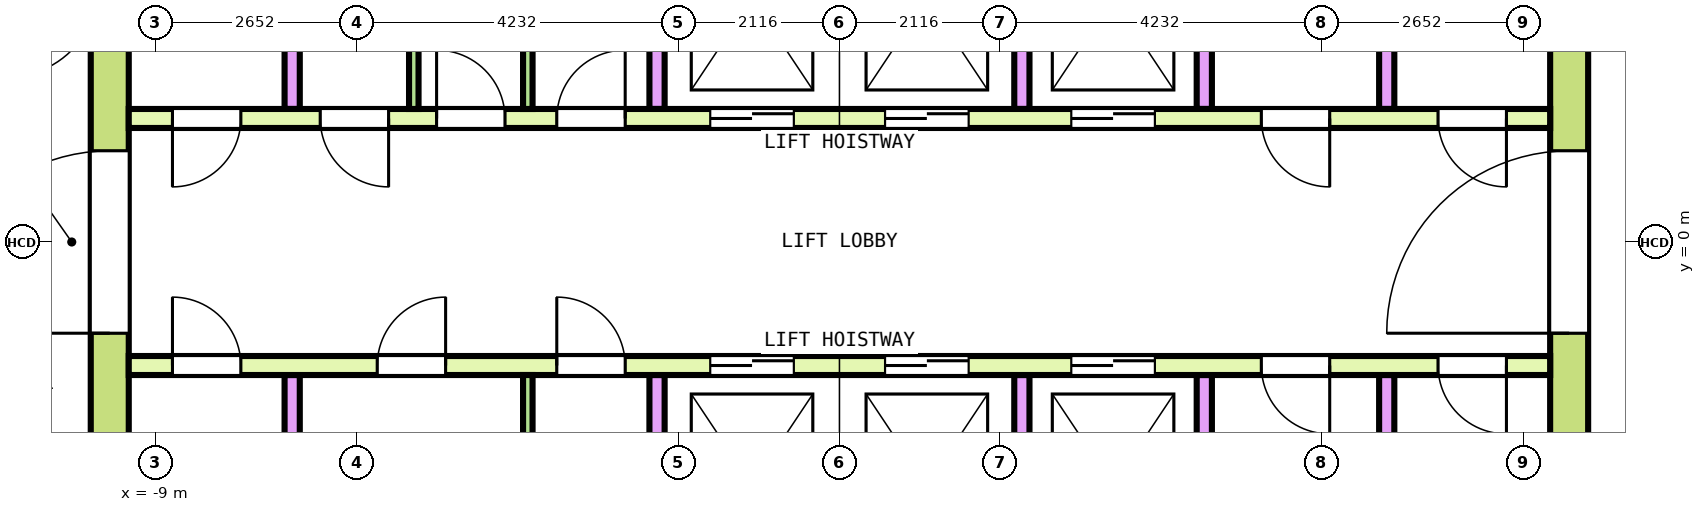
"""IFC4 building model, lengths in metres.
Left out: names, types, materials, properties, quantities, classifications, styles, units other than length and angle.
Written with IfcOpenShell. Run it as: python <this file> out.ifc"""

import sys

from ifc_helpers import new_model, si_unit, direction, frame, frame_2d, origin, place, context, subcontext, project, spatial, rectangle, extrude, element, fill, save


model = new_model("IFC4")
c1 = context("Model", 3, precision=1e-05, world=origin(), true_north=direction((0.0, 1.0)))
c2 = subcontext(c1, "Body", "Model", "MODEL_VIEW")
j1 = project(units=[si_unit("LENGTHUNIT", "METRE"), si_unit("PLANEANGLEUNIT", "RADIAN")], contexts=[c1])
p1 = place(None, origin())
s1 = spatial("IfcSite", under=j1, at=p1, CompositionType="ELEMENT")
p2 = place(p1, origin())
s2 = spatial("IfcBuilding", under=s1, at=p2, CompositionType="ELEMENT")
p3 = place(p2, frame((0.0, 0.0, 308.6)))
s3 = spatial("IfcBuildingStorey", under=s2, at=p3, CompositionType="ELEMENT", Elevation=308.6)
p4 = place(p3, frame((-9.6, -7.85, 0.0), z_axis=(0.0, 0.0, 1.0), x_axis=(0.0, 1.0, 0.0)))
e1 = element("IfcWall", 1, at=p4, inside=s3, PredefinedType="SHEAR", context=c2, shape_type="SweptSolid", body=[
    extrude(rectangle(XDim=15.7, YDim=0.5, at=frame_2d((7.85, 0.0))), origin(), (0.0, 0.0, 1.0), 3.7),
])
p5 = place(p4, frame((6.65, 0.0, 0.0)))
e2 = element("IfcOpeningElement", 2, at=p5, cuts=e1, PredefinedType="OPENING", context=c2, shape_type="SweptSolid", body=[
    extrude(rectangle(XDim=2.4, YDim=2.1, at=frame_2d((1.2, 1.05))), frame((0.0, 0.26, 0.0), z_axis=(0.0, -1.0, 0.0), x_axis=(1.0, 0.0, 0.0)), (0.0, 0.0, 1.0), 0.52),
])
p6 = place(p4, frame((13.55, 0.0, 0.0)))
e3 = element("IfcOpeningElement", 3, at=p6, cuts=e1, PredefinedType="OPENING", context=c2, shape_type="SweptSolid", body=[
    extrude(rectangle(XDim=1.2, YDim=2.1, at=frame_2d((0.6, 1.05))), frame((0.0, 0.26, 0.0), z_axis=(0.0, -1.0, 0.0), x_axis=(1.0, 0.0, 0.0)), (0.0, 0.0, 1.0), 0.52),
])
p7 = place(p4, frame((0.95, 0.0, 0.0)))
e4 = element("IfcOpeningElement", 4, at=p7, cuts=e1, PredefinedType="OPENING", context=c2, shape_type="SweptSolid", body=[
    extrude(rectangle(XDim=1.2, YDim=2.1, at=frame_2d((0.6, 1.05))), frame((0.0, 0.26, 0.0), z_axis=(0.0, -1.0, 0.0), x_axis=(1.0, 0.0, 0.0)), (0.0, 0.0, 1.0), 0.52),
])
p8 = place(p3, frame((9.6, -7.85, 0.0), z_axis=(0.0, 0.0, 1.0), x_axis=(0.0, 1.0, 0.0)))
e5 = element("IfcWall", 5, at=p8, inside=s3, PredefinedType="SHEAR", context=c2, shape_type="SweptSolid", body=[
    extrude(rectangle(XDim=15.7, YDim=0.5, at=frame_2d((7.85, 0.0))), origin(), (0.0, 0.0, 1.0), 3.7),
])
p9 = place(p8, frame((6.65, 0.0, 0.0)))
e6 = element("IfcOpeningElement", 6, at=p9, cuts=e5, PredefinedType="OPENING", context=c2, shape_type="SweptSolid", body=[
    extrude(rectangle(XDim=2.4, YDim=2.1, at=frame_2d((1.2, 1.05))), frame((0.0, 0.26, 0.0), z_axis=(0.0, -1.0, 0.0), x_axis=(1.0, 0.0, 0.0)), (0.0, 0.0, 1.0), 0.52),
])
p10 = place(p8, frame((13.55, 0.0, 0.0)))
e7 = element("IfcOpeningElement", 7, at=p10, cuts=e5, PredefinedType="OPENING", context=c2, shape_type="SweptSolid", body=[
    extrude(rectangle(XDim=1.2, YDim=2.1, at=frame_2d((0.6, 1.05))), frame((0.0, 0.26, 0.0), z_axis=(0.0, -1.0, 0.0), x_axis=(1.0, 0.0, 0.0)), (0.0, 0.0, 1.0), 0.52),
])
p11 = place(p8, frame((1.05, 0.0, 0.0)))
e8 = element("IfcOpeningElement", 8, at=p11, cuts=e5, PredefinedType="OPENING", context=c2, shape_type="SweptSolid", body=[
    extrude(rectangle(XDim=1.0, YDim=2.1, at=frame_2d((0.5, 1.05))), frame((0.0, 0.26, 0.0), z_axis=(0.0, -1.0, 0.0), x_axis=(1.0, 0.0, 0.0)), (0.0, 0.0, 1.0), 0.52),
])
p12 = place(p3, frame((-9.35, 1.625, 0.0), z_axis=(0.0, 0.0, 1.0), x_axis=(1.0, 0.0, 0.0)))
e9 = element("IfcWall", 9, at=p12, inside=s3, PredefinedType="SOLIDWALL", context=c2, shape_type="SweptSolid", body=[
    extrude(rectangle(XDim=18.7, YDim=0.25, at=frame_2d((9.35, 0.0))), origin(), (0.0, 0.0, 1.0), 3.7),
])
p13 = place(p12, frame((7.65, 0.0, 0.0)))
e10 = element("IfcOpeningElement", 10, at=p13, cuts=e9, PredefinedType="OPENING", context=c2, shape_type="SweptSolid", body=[
    extrude(rectangle(XDim=1.1, YDim=2.1, at=frame_2d((0.55, 1.05))), frame((0.0, 0.135, 0.0), z_axis=(0.0, -1.0, 0.0), x_axis=(1.0, 0.0, 0.0)), (0.0, 0.0, 1.0), 0.27),
])
p14 = place(p12, frame((9.95, 0.0, 0.0)))
e11 = element("IfcOpeningElement", 11, at=p14, cuts=e9, PredefinedType="OPENING", context=c2, shape_type="SweptSolid", body=[
    extrude(rectangle(XDim=1.1, YDim=2.1, at=frame_2d((0.55, 1.05))), frame((0.0, 0.135, 0.0), z_axis=(0.0, -1.0, 0.0), x_axis=(1.0, 0.0, 0.0)), (0.0, 0.0, 1.0), 0.27),
])
p15 = place(p12, frame((12.4, 0.0, 0.0)))
e12 = element("IfcOpeningElement", 12, at=p15, cuts=e9, PredefinedType="OPENING", context=c2, shape_type="SweptSolid", body=[
    extrude(rectangle(XDim=1.1, YDim=2.1, at=frame_2d((0.55, 1.05))), frame((0.0, 0.135, 0.0), z_axis=(0.0, -1.0, 0.0), x_axis=(1.0, 0.0, 0.0)), (0.0, 0.0, 1.0), 0.27),
])
p16 = place(p12, frame((0.575, 0.0, 0.0)))
e13 = element("IfcOpeningElement", 13, at=p16, cuts=e9, PredefinedType="OPENING", context=c2, shape_type="SweptSolid", body=[
    extrude(rectangle(XDim=0.9, YDim=2.1, at=frame_2d((0.45, 1.05))), frame((0.0, 0.135, 0.0), z_axis=(0.0, -1.0, 0.0), x_axis=(1.0, 0.0, 0.0)), (0.0, 0.0, 1.0), 0.27),
])
p17 = place(p12, frame((2.519, 0.0, 0.0)))
e14 = element("IfcOpeningElement", 14, at=p17, cuts=e9, PredefinedType="OPENING", context=c2, shape_type="SweptSolid", body=[
    extrude(rectangle(XDim=0.9, YDim=2.1, at=frame_2d((0.45, 1.05))), frame((0.0, 0.135, 0.0), z_axis=(0.0, -1.0, 0.0), x_axis=(1.0, 0.0, 0.0)), (0.0, 0.0, 1.0), 0.27),
])
p18 = place(p12, frame((4.05, 0.0, 0.0)))
e15 = element("IfcOpeningElement", 15, at=p18, cuts=e9, PredefinedType="OPENING", context=c2, shape_type="SweptSolid", body=[
    extrude(rectangle(XDim=0.9, YDim=2.1, at=frame_2d((0.45, 1.05))), frame((0.0, 0.135, 0.0), z_axis=(0.0, -1.0, 0.0), x_axis=(1.0, 0.0, 0.0)), (0.0, 0.0, 1.0), 0.27),
])
p19 = place(p12, frame((5.631, 0.0, 0.0)))
e16 = element("IfcOpeningElement", 16, at=p19, cuts=e9, PredefinedType="OPENING", context=c2, shape_type="SweptSolid", body=[
    extrude(rectangle(XDim=0.9, YDim=2.1, at=frame_2d((0.45, 1.05))), frame((0.0, 0.135, 0.0), z_axis=(0.0, -1.0, 0.0), x_axis=(1.0, 0.0, 0.0)), (0.0, 0.0, 1.0), 0.27),
])
p20 = place(p12, frame((14.9, 0.0, 0.0)))
e17 = element("IfcOpeningElement", 17, at=p20, cuts=e9, PredefinedType="OPENING", context=c2, shape_type="SweptSolid", body=[
    extrude(rectangle(XDim=0.9, YDim=2.1, at=frame_2d((0.45, 1.05))), frame((0.0, 0.135, 0.0), z_axis=(0.0, -1.0, 0.0), x_axis=(1.0, 0.0, 0.0)), (0.0, 0.0, 1.0), 0.27),
])
p21 = place(p12, frame((17.225, 0.0, 0.0)))
e18 = element("IfcOpeningElement", 18, at=p21, cuts=e9, PredefinedType="OPENING", context=c2, shape_type="SweptSolid", body=[
    extrude(rectangle(XDim=0.9, YDim=2.1, at=frame_2d((0.45, 1.05))), frame((0.0, 0.135, 0.0), z_axis=(0.0, -1.0, 0.0), x_axis=(1.0, 0.0, 0.0)), (0.0, 0.0, 1.0), 0.27),
])
for number, where, z_axis, x_axis in (
    (19, (-7.2, 1.75, 0.0), (0.0, 0.0, 1.0), (0.0, 1.0, 0.0)),
    (20, (-2.4, 1.75, 0.0), (0.0, 0.0, 1.0), (0.0, 1.0, 0.0)),
    (21, (2.4, 1.75, 0.0), (0.0, 0.0, 1.0), (0.0, 1.0, 0.0)),
    (22, (4.8, 1.75, 0.0), (0.0, 0.0, 1.0), (0.0, 1.0, 0.0)),
    (23, (7.2, 1.75, 0.0), (0.0, 0.0, 1.0), (0.0, 1.0, 0.0)),
):
    element("IfcWall", number, at=place(p3, frame(where, z_axis=z_axis, x_axis=x_axis)), inside=s3, PredefinedType="SOLIDWALL", context=c2, shape_type="SweptSolid", body=[
        extrude(rectangle(XDim=2.9, YDim=0.2, at=frame_2d((1.45, 0.0))), origin(), (0.0, 0.0, 1.0), 3.7),
    ])
p22 = place(p3, frame((-9.35, -1.625, 0.0), z_axis=(0.0, 0.0, 1.0), x_axis=(1.0, 0.0, 0.0)))
e24 = element("IfcWall", 24, at=p22, inside=s3, PredefinedType="SOLIDWALL", context=c2, shape_type="SweptSolid", body=[
    extrude(rectangle(XDim=18.7, YDim=0.25, at=frame_2d((9.35, 0.0))), origin(), (0.0, 0.0, 1.0), 3.7),
])
p23 = place(p22, frame((7.65, 0.0, 0.0)))
e25 = element("IfcOpeningElement", 25, at=p23, cuts=e24, PredefinedType="OPENING", context=c2, shape_type="SweptSolid", body=[
    extrude(rectangle(XDim=1.1, YDim=2.1, at=frame_2d((0.55, 1.05))), frame((0.0, 0.135, 0.0), z_axis=(0.0, -1.0, 0.0), x_axis=(1.0, 0.0, 0.0)), (0.0, 0.0, 1.0), 0.27),
])
p24 = place(p22, frame((9.95, 0.0, 0.0)))
e26 = element("IfcOpeningElement", 26, at=p24, cuts=e24, PredefinedType="OPENING", context=c2, shape_type="SweptSolid", body=[
    extrude(rectangle(XDim=1.1, YDim=2.1, at=frame_2d((0.55, 1.05))), frame((0.0, 0.135, 0.0), z_axis=(0.0, -1.0, 0.0), x_axis=(1.0, 0.0, 0.0)), (0.0, 0.0, 1.0), 0.27),
])
p25 = place(p22, frame((12.4, 0.0, 0.0)))
e27 = element("IfcOpeningElement", 27, at=p25, cuts=e24, PredefinedType="OPENING", context=c2, shape_type="SweptSolid", body=[
    extrude(rectangle(XDim=1.1, YDim=2.1, at=frame_2d((0.55, 1.05))), frame((0.0, 0.135, 0.0), z_axis=(0.0, -1.0, 0.0), x_axis=(1.0, 0.0, 0.0)), (0.0, 0.0, 1.0), 0.27),
])
p26 = place(p22, frame((0.575, 0.0, 0.0)))
e28 = element("IfcOpeningElement", 28, at=p26, cuts=e24, PredefinedType="OPENING", context=c2, shape_type="SweptSolid", body=[
    extrude(rectangle(XDim=0.9, YDim=2.1, at=frame_2d((0.45, 1.05))), frame((0.0, 0.135, 0.0), z_axis=(0.0, -1.0, 0.0), x_axis=(1.0, 0.0, 0.0)), (0.0, 0.0, 1.0), 0.27),
])
p27 = place(p22, frame((3.269, 0.0, 0.0)))
e29 = element("IfcOpeningElement", 29, at=p27, cuts=e24, PredefinedType="OPENING", context=c2, shape_type="SweptSolid", body=[
    extrude(rectangle(XDim=0.9, YDim=2.1, at=frame_2d((0.45, 1.05))), frame((0.0, 0.135, 0.0), z_axis=(0.0, -1.0, 0.0), x_axis=(1.0, 0.0, 0.0)), (0.0, 0.0, 1.0), 0.27),
])
p28 = place(p22, frame((5.631, 0.0, 0.0)))
e30 = element("IfcOpeningElement", 30, at=p28, cuts=e24, PredefinedType="OPENING", context=c2, shape_type="SweptSolid", body=[
    extrude(rectangle(XDim=0.9, YDim=2.1, at=frame_2d((0.45, 1.05))), frame((0.0, 0.135, 0.0), z_axis=(0.0, -1.0, 0.0), x_axis=(1.0, 0.0, 0.0)), (0.0, 0.0, 1.0), 0.27),
])
p29 = place(p22, frame((14.9, 0.0, 0.0)))
e31 = element("IfcOpeningElement", 31, at=p29, cuts=e24, PredefinedType="OPENING", context=c2, shape_type="SweptSolid", body=[
    extrude(rectangle(XDim=0.9, YDim=2.1, at=frame_2d((0.45, 1.05))), frame((0.0, 0.135, 0.0), z_axis=(0.0, -1.0, 0.0), x_axis=(1.0, 0.0, 0.0)), (0.0, 0.0, 1.0), 0.27),
])
p30 = place(p22, frame((17.225, 0.0, 0.0)))
e32 = element("IfcOpeningElement", 32, at=p30, cuts=e24, PredefinedType="OPENING", context=c2, shape_type="SweptSolid", body=[
    extrude(rectangle(XDim=0.9, YDim=2.1, at=frame_2d((0.45, 1.05))), frame((0.0, 0.135, 0.0), z_axis=(0.0, -1.0, 0.0), x_axis=(1.0, 0.0, 0.0)), (0.0, 0.0, 1.0), 0.27),
])
for number, where, z_axis, x_axis in (
    (33, (-7.2, -4.65, 0.0), (0.0, 0.0, 1.0), (0.0, 1.0, 0.0)),
    (34, (-2.4, -4.65, 0.0), (0.0, 0.0, 1.0), (0.0, 1.0, 0.0)),
    (35, (2.4, -4.65, 0.0), (0.0, 0.0, 1.0), (0.0, 1.0, 0.0)),
    (36, (4.8, -4.65, 0.0), (0.0, 0.0, 1.0), (0.0, 1.0, 0.0)),
    (37, (7.2, -4.65, 0.0), (0.0, 0.0, 1.0), (0.0, 1.0, 0.0)),
):
    element("IfcWall", number, at=place(p3, frame(where, z_axis=z_axis, x_axis=x_axis)), inside=s3, PredefinedType="SOLIDWALL", context=c2, shape_type="SweptSolid", body=[
        extrude(rectangle(XDim=2.9, YDim=0.2, at=frame_2d((1.45, 0.0))), origin(), (0.0, 0.0, 1.0), 3.7),
    ])
for number, where, z_axis, x_axis in (
    (38, (-5.6, 1.75, 0.0), (0.0, 0.0, 1.0), (0.0, 1.0, 0.0)),
    (39, (-4.1, 1.75, 0.0), (0.0, 0.0, 1.0), (0.0, 1.0, 0.0)),
    (40, (-4.1, -4.65, 0.0), (0.0, 0.0, 1.0), (0.0, 1.0, 0.0)),
):
    element("IfcWall", number, at=place(p3, frame(where, z_axis=z_axis, x_axis=x_axis)), inside=s3, PredefinedType="PARTITIONING", context=c2, shape_type="SweptSolid", body=[
        extrude(rectangle(XDim=2.9, YDim=0.125, at=frame_2d((1.45, 0.0))), origin(), (0.0, 0.0, 1.0), 3.7),
    ])
p31 = place(p13, origin())
e41 = element("IfcDoor", 41, at=p31, inside=s3, OperationType="DOUBLE_DOOR_SLIDING", PredefinedType="DOOR", context=c2, shape_type="SweptSolid", body=[
    extrude(rectangle(XDim=1.1, YDim=2.1, at=frame_2d((0.55, 1.05))), frame((0.0, 0.075, 0.0), z_axis=(0.0, -1.0, 0.0), x_axis=(1.0, 0.0, 0.0)), (0.0, 0.0, 1.0), 0.15),
])
fill(e10, e41)
p32 = place(p14, origin())
e42 = element("IfcDoor", 42, at=p32, inside=s3, OperationType="DOUBLE_DOOR_SLIDING", PredefinedType="DOOR", context=c2, shape_type="SweptSolid", body=[
    extrude(rectangle(XDim=1.1, YDim=2.1, at=frame_2d((0.55, 1.05))), frame((0.0, 0.075, 0.0), z_axis=(0.0, -1.0, 0.0), x_axis=(1.0, 0.0, 0.0)), (0.0, 0.0, 1.0), 0.15),
])
fill(e11, e42)
p33 = place(p15, origin())
e43 = element("IfcDoor", 43, at=p33, inside=s3, OperationType="DOUBLE_DOOR_SLIDING", PredefinedType="DOOR", context=c2, shape_type="SweptSolid", body=[
    extrude(rectangle(XDim=1.1, YDim=2.1, at=frame_2d((0.55, 1.05))), frame((0.0, 0.075, 0.0), z_axis=(0.0, -1.0, 0.0), x_axis=(1.0, 0.0, 0.0)), (0.0, 0.0, 1.0), 0.15),
])
fill(e12, e43)
p34 = place(p23, origin())
e44 = element("IfcDoor", 44, at=p34, inside=s3, OperationType="DOUBLE_DOOR_SLIDING", PredefinedType="DOOR", context=c2, shape_type="SweptSolid", body=[
    extrude(rectangle(XDim=1.1, YDim=2.1, at=frame_2d((0.55, 1.05))), frame((0.0, 0.075, 0.0), z_axis=(0.0, -1.0, 0.0), x_axis=(1.0, 0.0, 0.0)), (0.0, 0.0, 1.0), 0.15),
])
fill(e25, e44)
p35 = place(p24, origin())
e45 = element("IfcDoor", 45, at=p35, inside=s3, OperationType="DOUBLE_DOOR_SLIDING", PredefinedType="DOOR", context=c2, shape_type="SweptSolid", body=[
    extrude(rectangle(XDim=1.1, YDim=2.1, at=frame_2d((0.55, 1.05))), frame((0.0, 0.075, 0.0), z_axis=(0.0, -1.0, 0.0), x_axis=(1.0, 0.0, 0.0)), (0.0, 0.0, 1.0), 0.15),
])
fill(e26, e45)
p36 = place(p25, origin())
e46 = element("IfcDoor", 46, at=p36, inside=s3, OperationType="DOUBLE_DOOR_SLIDING", PredefinedType="DOOR", context=c2, shape_type="SweptSolid", body=[
    extrude(rectangle(XDim=1.1, YDim=2.1, at=frame_2d((0.55, 1.05))), frame((0.0, 0.075, 0.0), z_axis=(0.0, -1.0, 0.0), x_axis=(1.0, 0.0, 0.0)), (0.0, 0.0, 1.0), 0.15),
])
fill(e27, e46)
p37 = place(p5, origin())
e47 = element("IfcDoor", 47, at=p37, inside=s3, OperationType="DOUBLE_DOOR_SINGLE_SWING", PredefinedType="DOOR", context=c2, shape_type="SweptSolid", body=[
    extrude(rectangle(XDim=2.4, YDim=2.1, at=frame_2d((1.2, 1.05))), frame((0.0, 0.2, 0.0), z_axis=(0.0, -1.0, 0.0), x_axis=(1.0, 0.0, 0.0)), (0.0, 0.0, 1.0), 0.4),
])
fill(e2, e47)
p38 = place(p9, origin())
e48 = element("IfcDoor", 48, at=p38, inside=s3, OperationType="DOUBLE_DOOR_SINGLE_SWING", PredefinedType="DOOR", context=c2, shape_type="SweptSolid", body=[
    extrude(rectangle(XDim=2.4, YDim=2.1, at=frame_2d((1.2, 1.05))), frame((0.0, 0.2, 0.0), z_axis=(0.0, -1.0, 0.0), x_axis=(1.0, 0.0, 0.0)), (0.0, 0.0, 1.0), 0.4),
])
fill(e6, e48)
p39 = place(p16, origin())
e49 = element("IfcDoor", 49, at=p39, inside=s3, OperationType="SINGLE_SWING_LEFT", PredefinedType="DOOR", context=c2, shape_type="SweptSolid", body=[
    extrude(rectangle(XDim=0.9, YDim=2.1, at=frame_2d((0.45, 1.05))), frame((0.0, 0.075, 0.0), z_axis=(0.0, -1.0, 0.0), x_axis=(1.0, 0.0, 0.0)), (0.0, 0.0, 1.0), 0.15),
])
fill(e13, e49)
p40 = place(p17, origin())
e50 = element("IfcDoor", 50, at=p40, inside=s3, OperationType="SINGLE_SWING_RIGHT", PredefinedType="DOOR", context=c2, shape_type="SweptSolid", body=[
    extrude(rectangle(XDim=0.9, YDim=2.1, at=frame_2d((0.45, 1.05))), frame((0.0, 0.075, 0.0), z_axis=(0.0, -1.0, 0.0), x_axis=(1.0, 0.0, 0.0)), (0.0, 0.0, 1.0), 0.15),
])
fill(e14, e50)
p41 = place(p18, origin())
e51 = element("IfcDoor", 51, at=p41, inside=s3, OperationType="SINGLE_SWING_LEFT", PredefinedType="DOOR", context=c2, shape_type="SweptSolid", body=[
    extrude(rectangle(XDim=0.9, YDim=2.1, at=frame_2d((0.45, 1.05))), frame((0.0, 0.075, 0.0), z_axis=(0.0, -1.0, 0.0), x_axis=(1.0, 0.0, 0.0)), (0.0, 0.0, 1.0), 0.15),
])
fill(e15, e51)
p42 = place(p19, origin())
e52 = element("IfcDoor", 52, at=p42, inside=s3, OperationType="SINGLE_SWING_RIGHT", PredefinedType="DOOR", context=c2, shape_type="SweptSolid", body=[
    extrude(rectangle(XDim=0.9, YDim=2.1, at=frame_2d((0.45, 1.05))), frame((0.0, 0.075, 0.0), z_axis=(0.0, -1.0, 0.0), x_axis=(1.0, 0.0, 0.0)), (0.0, 0.0, 1.0), 0.15),
])
fill(e16, e52)
p43 = place(p20, origin())
e53 = element("IfcDoor", 53, at=p43, inside=s3, OperationType="SINGLE_SWING_LEFT", PredefinedType="DOOR", context=c2, shape_type="SweptSolid", body=[
    extrude(rectangle(XDim=0.9, YDim=2.1, at=frame_2d((0.45, 1.05))), frame((0.0, 0.075, 0.0), z_axis=(0.0, -1.0, 0.0), x_axis=(1.0, 0.0, 0.0)), (0.0, 0.0, 1.0), 0.15),
])
fill(e17, e53)
p44 = place(p21, origin())
e54 = element("IfcDoor", 54, at=p44, inside=s3, OperationType="SINGLE_SWING_RIGHT", PredefinedType="DOOR", context=c2, shape_type="SweptSolid", body=[
    extrude(rectangle(XDim=0.9, YDim=2.1, at=frame_2d((0.45, 1.05))), frame((0.0, 0.075, 0.0), z_axis=(0.0, -1.0, 0.0), x_axis=(1.0, 0.0, 0.0)), (0.0, 0.0, 1.0), 0.15),
])
fill(e18, e54)
p45 = place(p26, origin())
e55 = element("IfcDoor", 55, at=p45, inside=s3, OperationType="SINGLE_SWING_LEFT", PredefinedType="DOOR", context=c2, shape_type="SweptSolid", body=[
    extrude(rectangle(XDim=0.9, YDim=2.1, at=frame_2d((0.45, 1.05))), frame((0.0, 0.075, 0.0), z_axis=(0.0, -1.0, 0.0), x_axis=(1.0, 0.0, 0.0)), (0.0, 0.0, 1.0), 0.15),
])
fill(e28, e55)
p46 = place(p27, origin())
e56 = element("IfcDoor", 56, at=p46, inside=s3, OperationType="SINGLE_SWING_RIGHT", PredefinedType="DOOR", context=c2, shape_type="SweptSolid", body=[
    extrude(rectangle(XDim=0.9, YDim=2.1, at=frame_2d((0.45, 1.05))), frame((0.0, 0.075, 0.0), z_axis=(0.0, -1.0, 0.0), x_axis=(1.0, 0.0, 0.0)), (0.0, 0.0, 1.0), 0.15),
])
fill(e29, e56)
p47 = place(p28, origin())
e57 = element("IfcDoor", 57, at=p47, inside=s3, OperationType="SINGLE_SWING_LEFT", PredefinedType="DOOR", context=c2, shape_type="SweptSolid", body=[
    extrude(rectangle(XDim=0.9, YDim=2.1, at=frame_2d((0.45, 1.05))), frame((0.0, 0.075, 0.0), z_axis=(0.0, -1.0, 0.0), x_axis=(1.0, 0.0, 0.0)), (0.0, 0.0, 1.0), 0.15),
])
fill(e30, e57)
p48 = place(p29, origin())
e58 = element("IfcDoor", 58, at=p48, inside=s3, OperationType="SINGLE_SWING_RIGHT", PredefinedType="DOOR", context=c2, shape_type="SweptSolid", body=[
    extrude(rectangle(XDim=0.9, YDim=2.1, at=frame_2d((0.45, 1.05))), frame((0.0, 0.075, 0.0), z_axis=(0.0, -1.0, 0.0), x_axis=(1.0, 0.0, 0.0)), (0.0, 0.0, 1.0), 0.15),
])
fill(e31, e58)
p49 = place(p30, origin())
e59 = element("IfcDoor", 59, at=p49, inside=s3, OperationType="SINGLE_SWING_LEFT", PredefinedType="DOOR", context=c2, shape_type="SweptSolid", body=[
    extrude(rectangle(XDim=0.9, YDim=2.1, at=frame_2d((0.45, 1.05))), frame((0.0, 0.075, 0.0), z_axis=(0.0, -1.0, 0.0), x_axis=(1.0, 0.0, 0.0)), (0.0, 0.0, 1.0), 0.15),
])
fill(e32, e59)
save(model, sys.argv[1])
